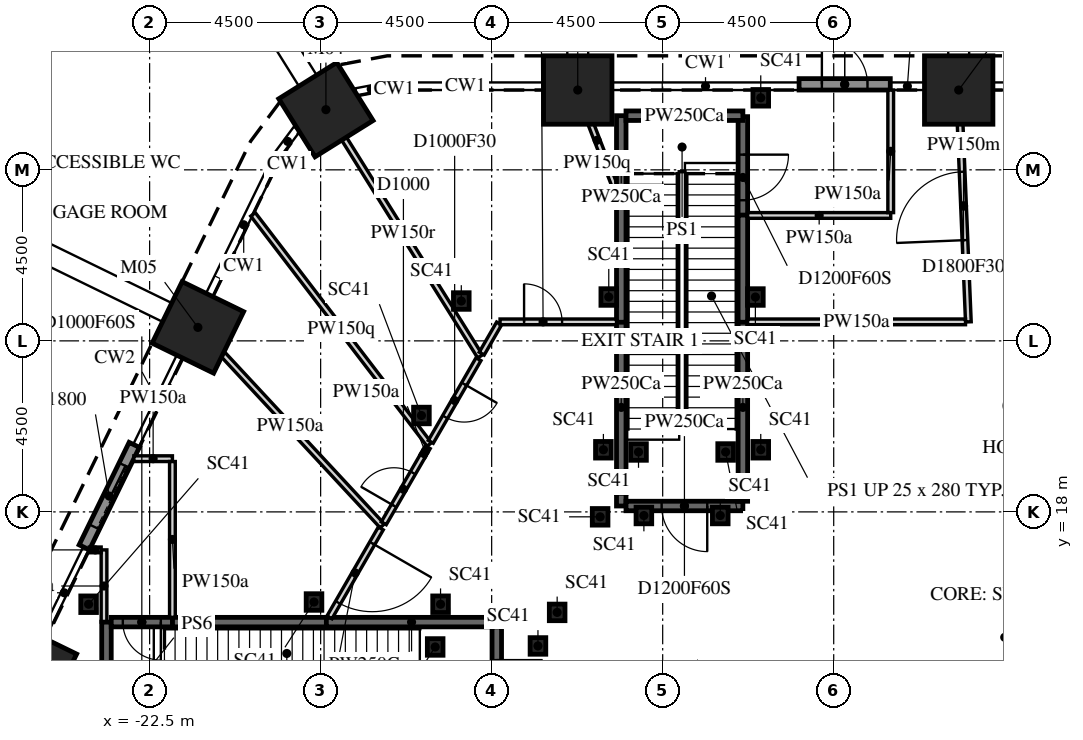
"""IFC4 building model, lengths in metres.
Left out: names, types, materials, properties, quantities, classifications, styles, units other than length and angle.
Written with IfcOpenShell. Run it as: python <this file> out.ifc"""

import sys

from ifc_helpers import new_model, si_unit, direction, frame, frame_2d, origin, origin_2d, place, context, subcontext, project, spatial, rectangle, i_section, extrude, element, fill, save


model = new_model("IFC4")
c1 = context("Model", 3, precision=1e-05, world=origin(), true_north=direction((0.0, 1.0)))
c2 = subcontext(c1, "Body", "Model", "MODEL_VIEW")
j1 = project(units=[si_unit("LENGTHUNIT", "METRE"), si_unit("PLANEANGLEUNIT", "RADIAN")], contexts=[c1])
p1 = place(None, origin())
s1 = spatial("IfcSite", under=j1, at=p1, CompositionType="ELEMENT")
p2 = place(p1, origin())
s2 = spatial("IfcBuilding", under=s1, at=p2, CompositionType="ELEMENT")
p3 = place(p2, origin())
s3 = spatial("IfcBuildingStorey", under=s2, at=p3, CompositionType="ELEMENT", Elevation=0.0)
for number, where, z_axis, x_axis in (
    (1, (-1.211, 29.1, -2.1), (0.0, 0.0, 1.0), (1.0, 0.0, 0.0)),
    (2, (-11.235, 29.1, -2.1), (0.0, 0.0, 1.0), (1.0, 0.0, 0.0)),
    (3, (-17.861, 28.583, -2.1), (0.0, 0.0, 1.0), (0.848, 0.53, 0.0)),
    (4, (-21.23, 22.854, -2.1), (0.0, 0.0, 1.0), (0.438, 0.899, 0.0)),
    (5, (-25.624, 13.845, -2.1), (0.0, 0.0, 1.0), (0.438, 0.899, 0.0)),
):
    element("IfcColumn", number, at=place(p3, frame(where, z_axis=z_axis, x_axis=x_axis)), inside=s3, PredefinedType="COLUMN", context=c2, shape_type="SweptSolid", body=[
        extrude(rectangle(XDim=1.8, YDim=1.8, at=origin_2d()), origin(), (0.0, 0.0, 1.0), 10.85),
    ])
for number, where, z_axis, x_axis in (
    (6, (-14.299, 23.549, -2.1), (0.0, 0.0, 1.0), (1.0, 0.0, 0.0)),
    (7, (-10.419, 23.654, -2.1), (0.0, 0.0, 1.0), (1.0, 0.0, 0.0)),
    (8, (-6.419, 28.895, -2.1), (0.0, 0.0, 1.0), (1.0, 0.0, 0.0)),
    (9, (-6.561, 23.654, -2.1), (0.0, 0.0, 1.0), (1.0, 0.0, 0.0)),
    (10, (-7.485, 17.905, -2.1), (0.0, 0.0, 1.0), (1.0, 0.0, 0.0)),
    (11, (-7.344, 19.576, -2.1), (0.0, 0.0, 1.0), (1.0, 0.0, 0.0)),
    (12, (-9.636, 19.576, -2.1), (0.0, 0.0, 1.0), (1.0, 0.0, 0.0)),
    (13, (-9.494, 17.905, -2.1), (0.0, 0.0, 1.0), (1.0, 0.0, 0.0)),
    (14, (-10.646, 17.87, -2.1), (0.0, 0.0, 1.0), (1.0, 0.0, 0.0)),
    (15, (-24.105, 15.57, -2.1), (0.0, 0.0, 1.0), (1.0, 0.0, 0.0)),
    (16, (-18.174, 15.629, -2.1), (0.0, 0.0, 1.0), (1.0, 0.0, 0.0)),
    (17, (-15.348, 20.536, -2.1), (0.0, 0.0, 1.0), (1.0, 0.0, 0.0)),
    (18, (-11.777, 15.355, -2.1), (0.0, 0.0, 1.0), (1.0, 0.0, 0.0)),
    (19, (-12.282, 14.473, -2.1), (0.0, 0.0, 1.0), (1.0, 0.0, 0.0)),
    (20, (-14.986, 14.446, -2.1), (0.0, 0.0, 1.0), (1.0, 0.0, 0.0)),
    (21, (-6.419, 19.635, -2.1), (0.0, 0.0, 1.0), (1.0, 0.0, 0.0)),
    (22, (-10.56, 19.635, -2.1), (0.0, 0.0, 1.0), (1.0, 0.0, 0.0)),
    (23, (-14.845, 15.57, -2.1), (0.0, 0.0, 1.0), (1.0, 0.0, 0.0)),
):
    element("IfcColumn", number, at=place(p3, frame(where, z_axis=z_axis, x_axis=x_axis)), inside=s3, PredefinedType="COLUMN", context=c2, shape_type="SweptSolid", body=[
        extrude(i_section(OverallWidth=0.412, OverallDepth=0.437, WebThickness=0.036, FlangeThickness=0.058, FilletRadius=0.015, at=origin_2d()), origin(), (0.0, 0.0, 1.0), 10.85),
    ])
p4 = place(p3, frame((-5.411, 29.25, 0.0), z_axis=(0.0, 0.0, 1.0), x_axis=(1.0, 0.0, 0.0)))
e24 = element("IfcWall", 24, at=p4, inside=s3, PredefinedType="SOLIDWALL", context=c2, shape_type="SweptSolid", body=[
    extrude(rectangle(XDim=2.4, YDim=0.3, at=frame_2d((1.2, 0.0))), origin(), (0.0, 0.0, 1.0), 7.823),
])
p5 = place(p4, frame((0.6, 0.0, 0.0)))
e25 = element("IfcOpeningElement", 25, at=p5, cuts=e24, PredefinedType="OPENING", context=c2, shape_type="SweptSolid", body=[
    extrude(rectangle(XDim=1.2, YDim=2.1, at=frame_2d((0.6, 1.05))), frame((0.0, 0.16, 0.0), z_axis=(0.0, -1.0, 0.0), x_axis=(1.0, 0.0, 0.0)), (0.0, 0.0, 1.0), 0.32),
])
p6 = place(p3, frame((-22.904, 19.764, 0.0), z_axis=(0.0, 0.0, 1.0), x_axis=(-0.43833704405, -0.898810678516, 0.0)))
e26 = element("IfcWall", 26, at=p6, inside=s3, PredefinedType="SOLIDWALL", context=c2, shape_type="SweptSolid", body=[
    extrude(rectangle(XDim=3.0, YDim=0.3, at=frame_2d((1.5, 0.0))), origin(), (0.0, 0.0, 1.0), 7.823),
])
p7 = place(p6, frame((0.6, 0.0, 0.0)))
e27 = element("IfcOpeningElement", 27, at=p7, cuts=e26, PredefinedType="OPENING", context=c2, shape_type="SweptSolid", body=[
    extrude(rectangle(XDim=1.8, YDim=2.4, at=frame_2d((0.9, 1.2))), frame((0.0, 0.16, 0.0), z_axis=(0.0, -1.0, 0.0), x_axis=(1.0, 0.0, 0.0)), (0.0, 0.0, 1.0), 0.32),
])
p8 = place(p3, frame((-23.7, 15.1, 0.0), z_axis=(0.0, 0.0, 1.0), x_axis=(0.0, 1.0, 0.0)))
e28 = element("IfcWall", 28, at=p8, inside=s3, PredefinedType="PARTITIONING", context=c2, shape_type="SweptSolid", body=[
    extrude(rectangle(XDim=1.9, YDim=0.15, at=frame_2d((0.95, 0.0))), origin(), (0.0, 0.0, 1.0), 8.75),
])
p9 = place(p3, frame((-23.775, 17.0, 0.0), z_axis=(0.0, 0.0, 1.0), x_axis=(-1.0, 0.0, 0.0)))
e29 = element("IfcWall", 29, at=p9, inside=s3, PredefinedType="PARTITIONING", context=c2, shape_type="SweptSolid", body=[
    extrude(rectangle(XDim=0.31, YDim=0.15, at=frame_2d((0.155, 0.0))), origin(), (0.0, 0.0, 1.0), 8.75),
])
p10 = place(p3, frame((-23.635, 11.9, 0.0), z_axis=(0.0, 0.0, 1.0), x_axis=(0.0, 1.0, 0.0)))
e30 = element("IfcWall", 30, at=p10, inside=s3, PredefinedType="PARTITIONING", context=c2, shape_type="SweptSolid", body=[
    extrude(rectangle(XDim=3.2, YDim=0.25, at=frame_2d((1.6, 0.0))), origin(), (0.0, 0.0, 1.0), 8.75),
])
p11 = place(p3, frame((-22.915, 19.4, 0.0), z_axis=(0.0, 0.0, 1.0), x_axis=(1.0, 0.0, 0.0)))
e31 = element("IfcWall", 31, at=p11, inside=s3, PredefinedType="PARTITIONING", context=c2, shape_type="SweptSolid", body=[
    extrude(rectangle(XDim=1.015, YDim=0.15, at=frame_2d((0.508, 0.0))), origin(), (0.0, 0.0, 1.0), 8.75),
])
p12 = place(p3, frame((-21.91, 15.1, 0.0), z_axis=(0.0, 0.0, 1.0), x_axis=(1.0, 0.0, 0.0)))
e32 = element("IfcWall", 32, at=p12, inside=s3, PredefinedType="PARTITIONING", context=c2, shape_type="SweptSolid", body=[
    extrude(rectangle(XDim=4.082, YDim=0.25, at=frame_2d((2.041, 0.0))), origin(), (0.0, 0.0, 1.0), 8.75),
])
p13 = place(p3, frame((-21.9, 15.1, 0.0), z_axis=(0.0, 0.0, 1.0), x_axis=(-1.0, 0.0, 0.0)))
e33 = element("IfcWall", 33, at=p13, inside=s3, PredefinedType="PARTITIONING", context=c2, shape_type="SweptSolid", body=[
    extrude(rectangle(XDim=1.61, YDim=0.25, at=frame_2d((0.805, 0.0))), origin(), (0.0, 0.0, 1.0), 8.75),
])
p14 = place(p13, frame((0.305, 0.0, 0.0)))
e34 = element("IfcOpeningElement", 34, at=p14, cuts=e33, PredefinedType="OPENING", context=c2, shape_type="SweptSolid", body=[
    extrude(rectangle(XDim=1.0, YDim=2.1, at=frame_2d((0.5, 1.05))), frame((0.0, 0.135, 0.0), z_axis=(0.0, -1.0, 0.0), x_axis=(1.0, 0.0, 0.0)), (0.0, 0.0, 1.0), 0.27),
])
p15 = place(p3, frame((-21.9, 19.325, 0.0), z_axis=(0.0, 0.0, 1.0), x_axis=(0.0, -1.0, 0.0)))
e35 = element("IfcWall", 35, at=p15, inside=s3, PredefinedType="PARTITIONING", context=c2, shape_type="SweptSolid", body=[
    extrude(rectangle(XDim=4.1, YDim=0.15, at=frame_2d((2.05, 0.0))), origin(), (0.0, 0.0, 1.0), 8.75),
])
p16 = place(p3, frame((-21.23, 22.854, 0.0), z_axis=(0.0, 0.0, 1.0), x_axis=(0.68068621698, -0.732575097866, 0.0)))
e36 = element("IfcWall", 36, at=p16, inside=s3, PredefinedType="PARTITIONING", context=c2, shape_type="SweptSolid", body=[
    extrude(rectangle(XDim=7.128, YDim=0.15, at=frame_2d((3.564, 0.0))), origin(), (0.0, 0.0, 1.0), 8.75),
])
p17 = place(p3, frame((-19.779, 25.828, 0.0), z_axis=(0.0, 0.0, 1.0), x_axis=(0.608006046858, -0.793932394467, 0.0)))
e37 = element("IfcWall", 37, at=p17, inside=s3, PredefinedType="PARTITIONING", context=c2, shape_type="SweptSolid", body=[
    extrude(rectangle(XDim=7.626, YDim=0.15, at=frame_2d((3.813, 0.0))), origin(), (0.0, 0.0, 1.0), 7.823),
])
p18 = place(p3, frame((-17.861, 28.584, 0.0), z_axis=(0.0, 0.0, 1.0), x_axis=(0.529910081433, -0.848053834138, 0.0)))
e38 = element("IfcWall", 38, at=p18, inside=s3, PredefinedType="PARTITIONING", context=c2, shape_type="SweptSolid", body=[
    extrude(rectangle(XDim=7.656, YDim=0.15, at=frame_2d((3.828, 0.0))), origin(), (0.0, 0.0, 1.0), 7.988),
])
p19 = place(p3, frame((-17.85, 15.1, 0.0), z_axis=(0.0, 0.0, 1.0), x_axis=(1.0, 0.0, 0.0)))
e39 = element("IfcWall", 39, at=p19, inside=s3, PredefinedType="PARTITIONING", context=c2, shape_type="SweptSolid", body=[
    extrude(rectangle(XDim=4.485, YDim=0.25, at=frame_2d((2.243, 0.0))), origin(), (0.0, 0.0, 1.0), 8.75),
])
p20 = place(p3, frame((-16.417, 17.564, 0.0), z_axis=(0.0, 0.0, 1.0), x_axis=(-0.500066738792, -0.865986868696, 0.0)))
e40 = element("IfcWall", 40, at=p20, inside=s3, PredefinedType="PARTITIONING", context=c2, shape_type="SweptSolid", body=[
    extrude(rectangle(XDim=2.701, YDim=0.15, at=frame_2d((1.351, 0.0))), origin(), (0.0, 0.0, 1.0), 8.75),
])
p21 = place(p20, frame((0.45, 0.0, 0.0)))
e41 = element("IfcOpeningElement", 41, at=p21, cuts=e40, PredefinedType="OPENING", context=c2, shape_type="SweptSolid", body=[
    extrude(rectangle(XDim=1.8, YDim=2.1, at=frame_2d((0.9, 1.05))), frame((0.0, 0.085, 0.0), z_axis=(0.0, -1.0, 0.0), x_axis=(1.0, 0.0, 0.0)), (0.0, 0.0, 1.0), 0.17),
])
p22 = place(p3, frame((-16.339, 17.7, 0.0), z_axis=(0.0, 0.0, 1.0), x_axis=(0.500370112486, 0.865811613765, 0.0)))
e42 = element("IfcWall", 42, at=p22, inside=s3, PredefinedType="PARTITIONING", context=c2, shape_type="SweptSolid", body=[
    extrude(rectangle(XDim=2.066, YDim=0.15, at=frame_2d((1.033, 0.0))), origin(), (0.0, 0.0, 1.0), 8.75),
])
p23 = place(p22, frame((0.533, 0.0, 0.0)))
e43 = element("IfcOpeningElement", 43, at=p23, cuts=e42, PredefinedType="OPENING", context=c2, shape_type="SweptSolid", body=[
    extrude(rectangle(XDim=1.0, YDim=2.1, at=frame_2d((0.5, 1.05))), frame((0.0, 0.085, 0.0), z_axis=(0.0, -1.0, 0.0), x_axis=(1.0, 0.0, 0.0)), (0.0, 0.0, 1.0), 0.17),
])
p24 = place(p3, frame((-15.183, 19.703, 0.0), z_axis=(0.0, 0.0, 1.0), x_axis=(-0.49869419223, -0.86677800078, 0.0)))
e44 = element("IfcWall", 44, at=p24, inside=s3, PredefinedType="PARTITIONING", context=c2, shape_type="SweptSolid", body=[
    extrude(rectangle(XDim=0.267, YDim=0.15, at=frame_2d((0.134, 0.0))), origin(), (0.0, 0.0, 1.0), 8.75),
])
p25 = place(p3, frame((-13.846, 22.017, 0.0), z_axis=(0.0, 0.0, 1.0), x_axis=(-0.499904868165, -0.866080321209, 0.0)))
e45 = element("IfcWall", 45, at=p25, inside=s3, PredefinedType="PARTITIONING", context=c2, shape_type="SweptSolid", body=[
    extrude(rectangle(XDim=2.51, YDim=0.15, at=frame_2d((1.255, 0.0))), origin(), (0.0, 0.0, 1.0), 8.75),
])
p26 = place(p25, frame((0.755, 0.0, 0.0)))
e46 = element("IfcOpeningElement", 46, at=p26, cuts=e45, PredefinedType="OPENING", context=c2, shape_type="SweptSolid", body=[
    extrude(rectangle(XDim=1.0, YDim=2.1, at=frame_2d((0.5, 1.05))), frame((0.0, 0.085, 0.0), z_axis=(0.0, -1.0, 0.0), x_axis=(1.0, 0.0, 0.0)), (0.0, 0.0, 1.0), 0.17),
])
p27 = place(p3, frame((-13.365, 14.975, 0.0), z_axis=(0.0, 0.0, 1.0), x_axis=(0.0, -1.0, 0.0)))
e47 = element("IfcWall", 47, at=p27, inside=s3, PredefinedType="PARTITIONING", context=c2, shape_type="SweptSolid", body=[
    extrude(rectangle(XDim=2.95, YDim=0.25, at=frame_2d((1.475, 0.0))), origin(), (0.0, 0.0, 1.0), 8.297),
])
p28 = place(p27, frame((0.875, 0.0, 0.0)))
e48 = element("IfcOpeningElement", 48, at=p28, cuts=e47, PredefinedType="OPENING", context=c2, shape_type="SweptSolid", body=[
    extrude(rectangle(XDim=1.2, YDim=2.1, at=frame_2d((0.6, 1.05))), frame((0.0, 0.135, 0.0), z_axis=(0.0, -1.0, 0.0), x_axis=(1.0, 0.0, 0.0)), (0.0, 0.0, 1.0), 0.27),
])
p29 = place(p3, frame((-13.304, 22.958, 0.0), z_axis=(0.0, 0.0, 1.0), x_axis=(-0.499522450607, -0.866300941555, 0.0)))
e49 = element("IfcWall", 49, at=p29, inside=s3, PredefinedType="PARTITIONING", context=c2, shape_type="SweptSolid", body=[
    extrude(rectangle(XDim=0.916, YDim=0.15, at=frame_2d((0.458, 0.0))), origin(), (0.0, 0.0, 1.0), 8.75),
])
p30 = place(p3, frame((-10.09, 18.155, 0.0), z_axis=(0.0, 0.0, 1.0), x_axis=(0.0, 1.0, 0.0)))
e50 = element("IfcWall", 50, at=p30, inside=s3, PredefinedType="PARTITIONING", context=c2, shape_type="SweptSolid", body=[
    extrude(rectangle(XDim=0.355, YDim=0.25, at=frame_2d((0.177, 0.0))), origin(), (0.0, 0.0, 1.0), 8.75),
])
p31 = place(p3, frame((-10.09, 18.49, 0.0), z_axis=(0.0, 0.0, 1.0), x_axis=(0.0, 1.0, 0.0)))
e51 = element("IfcWall", 51, at=p31, inside=s3, PredefinedType="PARTITIONING", context=c2, shape_type="SweptSolid", body=[
    extrude(rectangle(XDim=4.52, YDim=0.25, at=frame_2d((2.26, 0.0))), origin(), (0.0, 0.0, 1.0), 8.75),
])
p32 = place(p3, frame((-10.09, 22.99, 0.0), z_axis=(0.0, 0.0, 1.0), x_axis=(0.0, 1.0, 0.0)))
e52 = element("IfcWall", 52, at=p32, inside=s3, PredefinedType="PARTITIONING", context=c2, shape_type="SweptSolid", body=[
    extrude(rectangle(XDim=3.171, YDim=0.25, at=frame_2d((1.585, 0.0))), origin(), (0.0, 0.0, 1.0), 8.75),
])
p33 = place(p3, frame((-13.279, 23.0, 0.0), z_axis=(0.0, 0.0, 1.0), x_axis=(1.0, 0.0, 0.0)))
e53 = element("IfcWall", 53, at=p33, inside=s3, PredefinedType="PARTITIONING", context=c2, shape_type="SweptSolid", body=[
    extrude(rectangle(XDim=3.064, YDim=0.15, at=frame_2d((1.532, 0.0))), origin(), (0.0, 0.0, 1.0), 8.75),
])
p34 = place(p33, frame((0.632, 0.0, 0.0)))
e54 = element("IfcOpeningElement", 54, at=p34, cuts=e53, PredefinedType="OPENING", context=c2, shape_type="SweptSolid", body=[
    extrude(rectangle(XDim=1.0, YDim=2.1, at=frame_2d((0.5, 1.05))), frame((0.0, 0.085, 0.0), z_axis=(0.0, -1.0, 0.0), x_axis=(1.0, 0.0, 0.0)), (0.0, 0.0, 1.0), 0.17),
])
p35 = place(p3, frame((-10.215, 26.458, 0.0), z_axis=(0.0, 0.0, 1.0), x_axis=(-0.360128239505, 0.932902809038, 0.0)))
e55 = element("IfcWall", 55, at=p35, inside=s3, PredefinedType="PARTITIONING", context=c2, shape_type="SweptSolid", body=[
    extrude(rectangle(XDim=2.832, YDim=0.15, at=frame_2d((1.416, 0.0))), origin(), (0.0, 0.0, 1.0), 7.823),
])
p36 = place(p3, frame((-10.09, 28.425, 0.0), z_axis=(0.0, 0.0, 1.0), x_axis=(0.0, -1.0, 0.0)))
e56 = element("IfcWall", 56, at=p36, inside=s3, PredefinedType="PARTITIONING", context=c2, shape_type="SweptSolid", body=[
    extrude(rectangle(XDim=2.083, YDim=0.25, at=frame_2d((1.042, 0.0))), origin(), (0.0, 0.0, 1.0), 8.75),
])
p37 = place(p3, frame((-6.89, 18.155, 0.0), z_axis=(0.0, 0.0, 1.0), x_axis=(-1.0, 0.0, 0.0)))
e57 = element("IfcWall", 57, at=p37, inside=s3, PredefinedType="PARTITIONING", context=c2, shape_type="SweptSolid", body=[
    extrude(rectangle(XDim=3.075, YDim=0.25, at=frame_2d((1.538, 0.0))), origin(), (0.0, 0.0, 1.0), 8.75),
])
p38 = place(p37, frame((0.938, 0.0, 0.0)))
e58 = element("IfcOpeningElement", 58, at=p38, cuts=e57, PredefinedType="OPENING", context=c2, shape_type="SweptSolid", body=[
    extrude(rectangle(XDim=1.2, YDim=2.1, at=frame_2d((0.6, 1.05))), frame((0.0, 0.135, 0.0), z_axis=(0.0, -1.0, 0.0), x_axis=(1.0, 0.0, 0.0)), (0.0, 0.0, 1.0), 0.27),
])
p39 = place(p3, frame((-6.89, 18.51, 0.0), z_axis=(0.0, 0.0, 1.0), x_axis=(0.0, -1.0, 0.0)))
e59 = element("IfcWall", 59, at=p39, inside=s3, PredefinedType="PARTITIONING", context=c2, shape_type="SweptSolid", body=[
    extrude(rectangle(XDim=0.23, YDim=0.25, at=frame_2d((0.115, 0.0))), origin(), (0.0, 0.0, 1.0), 8.75),
])
p40 = place(p3, frame((-6.89, 23.01, 0.0), z_axis=(0.0, 0.0, 1.0), x_axis=(0.0, -1.0, 0.0)))
e60 = element("IfcWall", 60, at=p40, inside=s3, PredefinedType="PARTITIONING", context=c2, shape_type="SweptSolid", body=[
    extrude(rectangle(XDim=4.52, YDim=0.25, at=frame_2d((2.26, 0.0))), origin(), (0.0, 0.0, 1.0), 8.75),
])
p41 = place(p3, frame((-6.89, 28.4, 0.0), z_axis=(0.0, 0.0, 1.0), x_axis=(0.0, -1.0, 0.0)))
e61 = element("IfcWall", 61, at=p41, inside=s3, PredefinedType="PARTITIONING", context=c2, shape_type="SweptSolid", body=[
    extrude(rectangle(XDim=2.6, YDim=0.25, at=frame_2d((1.3, 0.0))), origin(), (0.0, 0.0, 1.0), 8.75),
])
p42 = place(p41, frame((1.0, 0.0, 0.0)))
e62 = element("IfcOpeningElement", 62, at=p42, cuts=e61, PredefinedType="OPENING", context=c2, shape_type="SweptSolid", body=[
    extrude(rectangle(XDim=1.2, YDim=2.1, at=frame_2d((0.6, 1.05))), frame((0.0, 0.135, 0.0), z_axis=(0.0, -1.0, 0.0), x_axis=(1.0, 0.0, 0.0)), (0.0, 0.0, 1.0), 0.27),
])
p43 = place(p3, frame((-6.89, 25.81, 0.0), z_axis=(0.0, 0.0, 1.0), x_axis=(0.0, -1.0, 0.0)))
e63 = element("IfcWall", 63, at=p43, inside=s3, PredefinedType="PARTITIONING", context=c2, shape_type="SweptSolid", body=[
    extrude(rectangle(XDim=2.82, YDim=0.25, at=frame_2d((1.41, 0.0))), origin(), (0.0, 0.0, 1.0), 8.75),
])
p44 = place(p3, frame((-6.89, 28.425, 0.0), z_axis=(0.0, 0.0, 1.0), x_axis=(-1.0, 0.0, 0.0)))
e64 = element("IfcWall", 64, at=p44, inside=s3, PredefinedType="PARTITIONING", context=c2, shape_type="SweptSolid", body=[
    extrude(rectangle(XDim=3.075, YDim=0.25, at=frame_2d((1.538, 0.0))), origin(), (0.0, 0.0, 1.0), 8.75),
])
p45 = place(p3, frame((-3.0, 25.8, 0.0), z_axis=(0.0, 0.0, 1.0), x_axis=(-1.0, 0.0, 0.0)))
e65 = element("IfcWall", 65, at=p45, inside=s3, PredefinedType="PARTITIONING", context=c2, shape_type="SweptSolid", body=[
    extrude(rectangle(XDim=3.765, YDim=0.15, at=frame_2d((1.882, 0.0))), origin(), (0.0, 0.0, 1.0), 8.75),
])
p46 = place(p3, frame((-3.0, 29.1, 0.0), z_axis=(0.0, 0.0, 1.0), x_axis=(0.0, -1.0, 0.0)))
e66 = element("IfcWall", 66, at=p46, inside=s3, PredefinedType="PARTITIONING", context=c2, shape_type="SweptSolid", body=[
    extrude(rectangle(XDim=3.225, YDim=0.15, at=frame_2d((1.613, 0.0))), origin(), (0.0, 0.0, 1.0), 8.75),
])
p47 = place(p3, frame((-0.957, 23.0, 0.0), z_axis=(0.0, 0.0, 1.0), x_axis=(-0.041587299648, 0.999134874033, 0.0)))
e67 = element("IfcWall", 67, at=p47, inside=s3, PredefinedType="PARTITIONING", context=c2, shape_type="SweptSolid", body=[
    extrude(rectangle(XDim=6.105, YDim=0.15, at=frame_2d((3.053, 0.0))), origin(), (0.0, 0.0, 1.0), 8.297),
])
p48 = place(p47, frame((2.153, 0.0, 0.0)))
e68 = element("IfcOpeningElement", 68, at=p48, cuts=e67, PredefinedType="OPENING", context=c2, shape_type="SweptSolid", body=[
    extrude(rectangle(XDim=1.8, YDim=2.1, at=frame_2d((0.9, 1.05))), frame((0.0, 0.085, 0.0), z_axis=(0.0, -1.0, 0.0), x_axis=(1.0, 0.0, 0.0)), (0.0, 0.0, 1.0), 0.17),
])
p49 = place(p3, frame((-1.032, 23.0, 0.0), z_axis=(0.0, 0.0, 1.0), x_axis=(-1.0, 0.0, 0.0)))
e69 = element("IfcWall", 69, at=p49, inside=s3, PredefinedType="PARTITIONING", context=c2, shape_type="SweptSolid", body=[
    extrude(rectangle(XDim=5.733, YDim=0.15, at=frame_2d((2.866, 0.0))), origin(), (0.0, 0.0, 1.0), 8.75),
])
p50 = place(p5, frame((0.0, -0.025, 0.0)))
e70 = element("IfcDoor", 70, at=p50, inside=s3, OperationType="SINGLE_SWING_LEFT", PredefinedType="DOOR", context=c2, shape_type="SweptSolid", body=[
    extrude(rectangle(XDim=1.2, YDim=2.1, at=frame_2d((0.6, 1.05))), frame((0.0, 0.025, 0.0), z_axis=(0.0, -1.0, 0.0), x_axis=(1.0, 0.0, 0.0)), (0.0, 0.0, 1.0), 0.05),
])
fill(e25, e70)
p51 = place(p7, frame((0.0, -0.025, 0.0)))
e71 = element("IfcDoor", 71, at=p51, inside=s3, OperationType="DOUBLE_DOOR_SLIDING", PredefinedType="DOOR", context=c2, shape_type="SweptSolid", body=[
    extrude(rectangle(XDim=1.8, YDim=2.4, at=frame_2d((0.9, 1.2))), frame((0.0, 0.025, 0.0), z_axis=(0.0, -1.0, 0.0), x_axis=(1.0, 0.0, 0.0)), (0.0, 0.0, 1.0), 0.05),
])
fill(e27, e71)
p52 = place(p14, origin())
e72 = element("IfcDoor", 72, at=p52, inside=s3, OperationType="SINGLE_SWING_RIGHT", PredefinedType="DOOR", context=c2, shape_type="SweptSolid", body=[
    extrude(rectangle(XDim=1.0, YDim=2.1, at=frame_2d((0.5, 1.05))), frame((0.0, 0.025, 0.0), z_axis=(0.0, -1.0, 0.0), x_axis=(1.0, 0.0, 0.0)), (0.0, 0.0, 1.0), 0.05),
])
fill(e34, e72)
p53 = place(p21, origin())
e73 = element("IfcDoor", 73, at=p53, inside=s3, OperationType="DOUBLE_DOOR_SINGLE_SWING", PredefinedType="DOOR", context=c2, shape_type="SweptSolid", body=[
    extrude(rectangle(XDim=1.8, YDim=2.1, at=frame_2d((0.9, 1.05))), frame((0.0, 0.025, 0.0), z_axis=(0.0, -1.0, 0.0), x_axis=(1.0, 0.0, 0.0)), (0.0, 0.0, 1.0), 0.05),
])
fill(e41, e73)
p54 = place(p23, origin())
e74 = element("IfcDoor", 74, at=p54, inside=s3, OperationType="SINGLE_SWING_LEFT", PredefinedType="DOOR", context=c2, shape_type="SweptSolid", body=[
    extrude(rectangle(XDim=1.0, YDim=2.1, at=frame_2d((0.5, 1.05))), frame((0.0, 0.025, 0.0), z_axis=(0.0, -1.0, 0.0), x_axis=(1.0, 0.0, 0.0)), (0.0, 0.0, 1.0), 0.05),
])
fill(e43, e74)
p55 = place(p26, origin())
e75 = element("IfcDoor", 75, at=p55, inside=s3, OperationType="SINGLE_SWING_RIGHT", PredefinedType="DOOR", context=c2, shape_type="SweptSolid", body=[
    extrude(rectangle(XDim=1.0, YDim=2.1, at=frame_2d((0.5, 1.05))), frame((0.0, 0.025, 0.0), z_axis=(0.0, -1.0, 0.0), x_axis=(1.0, 0.0, 0.0)), (0.0, 0.0, 1.0), 0.05),
])
fill(e46, e75)
p56 = place(p34, origin())
e76 = element("IfcDoor", 76, at=p56, inside=s3, OperationType="SINGLE_SWING_LEFT", PredefinedType="DOOR", context=c2, shape_type="SweptSolid", body=[
    extrude(rectangle(XDim=1.0, YDim=2.1, at=frame_2d((0.5, 1.05))), frame((0.0, 0.025, 0.0), z_axis=(0.0, -1.0, 0.0), x_axis=(1.0, 0.0, 0.0)), (0.0, 0.0, 1.0), 0.05),
])
fill(e54, e76)
p57 = place(p38, origin())
e77 = element("IfcDoor", 77, at=p57, inside=s3, OperationType="SINGLE_SWING_LEFT", PredefinedType="DOOR", context=c2, shape_type="SweptSolid", body=[
    extrude(rectangle(XDim=1.2, YDim=2.1, at=frame_2d((0.6, 1.05))), frame((0.0, 0.025, 0.0), z_axis=(0.0, -1.0, 0.0), x_axis=(1.0, 0.0, 0.0)), (0.0, 0.0, 1.0), 0.05),
])
fill(e58, e77)
p58 = place(p42, origin())
e78 = element("IfcDoor", 78, at=p58, inside=s3, OperationType="SINGLE_SWING_RIGHT", PredefinedType="DOOR", context=c2, shape_type="SweptSolid", body=[
    extrude(rectangle(XDim=1.2, YDim=2.1, at=frame_2d((0.6, 1.05))), frame((0.0, 0.025, 0.0), z_axis=(0.0, -1.0, 0.0), x_axis=(1.0, 0.0, 0.0)), (0.0, 0.0, 1.0), 0.05),
])
fill(e62, e78)
p59 = place(p48, origin())
e79 = element("IfcDoor", 79, at=p59, inside=s3, OperationType="DOUBLE_DOOR_SINGLE_SWING", PredefinedType="DOOR", context=c2, shape_type="SweptSolid", body=[
    extrude(rectangle(XDim=1.8, YDim=2.1, at=frame_2d((0.9, 1.05))), frame((0.0, 0.025, 0.0), z_axis=(0.0, -1.0, 0.0), x_axis=(1.0, 0.0, 0.0)), (0.0, 0.0, 1.0), 0.05),
])
fill(e68, e79)
save(model, sys.argv[1])
